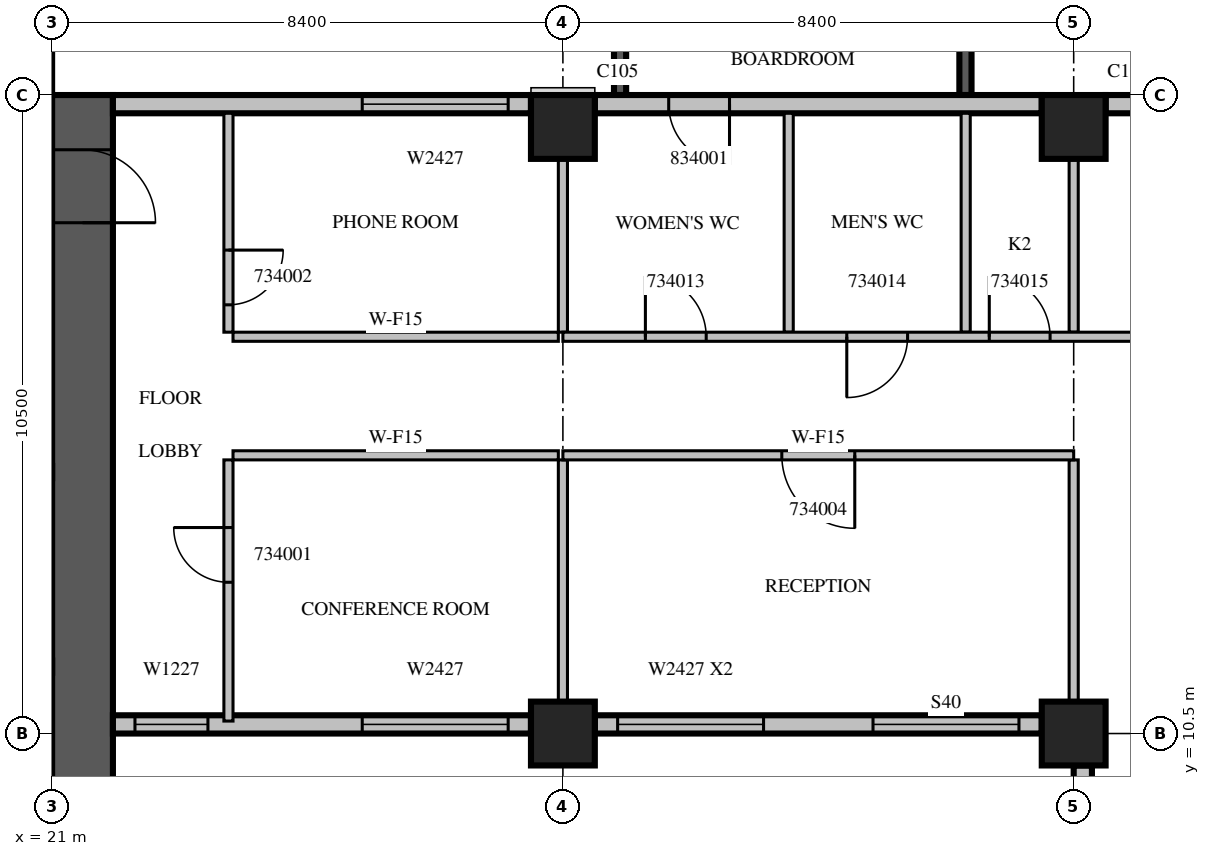
"""IFC4 building model, lengths in metres.
Left out: names, types, materials, properties, quantities, classifications, styles, units other than length and angle.
Written with IfcOpenShell. Run it as: python <this file> out.ifc"""

import sys

from ifc_helpers import new_model, si_unit, direction, frame, frame_2d, origin, origin_2d, place, context, subcontext, project, spatial, rectangle, extrude, source, transform, mapped, element, fill, save


model = new_model("IFC4")
c1 = context("Model", 3, precision=1e-05, world=origin(), true_north=direction((0.0, 1.0)))
c2 = subcontext(c1, "Body", "Model", "MODEL_VIEW")
j1 = project(units=[si_unit("LENGTHUNIT", "METRE"), si_unit("PLANEANGLEUNIT", "RADIAN")], contexts=[c1])
p1 = place(None, origin())
s1 = spatial("IfcSite", under=j1, at=p1, CompositionType="ELEMENT")
p2 = place(p1, origin())
s2 = spatial("IfcBuilding", under=s1, at=p2, CompositionType="ELEMENT")
p3 = place(p2, frame((0.0, 0.0, 153.9)))
s3 = spatial("IfcBuildingStorey", under=s2, at=p3, CompositionType="ELEMENT", Elevation=153.9)
m1 = source(origin(), c2, "Body", "SweptSolid", [
    extrude(rectangle(XDim=1.05, YDim=1.05, at=origin_2d()), origin(), (0.0, 0.0, 1.0), 4.2),
])
for number, where, z_axis, x_axis in (
    (1, (29.4, 10.5, 0.0), (0.0, 0.0, 1.0), (1.0, 0.0, 0.0)),
    (2, (37.8, 10.5, 0.0), (0.0, 0.0, 1.0), (1.0, 0.0, 0.0)),
    (3, (29.4, 20.475, 0.0), (0.0, 0.0, 1.0), (1.0, 0.0, 0.0)),
    (4, (37.8, 20.475, 0.0), (0.0, 0.0, 1.0), (1.0, 0.0, 0.0)),
):
    element("IfcColumn", number, at=place(p3, frame(where, z_axis=z_axis, x_axis=x_axis)), inside=s3, PredefinedType="COLUMN", context=c2, shape_type="MappedRepresentation", body=[
        mapped(m1, transform((0.0, 0.0, 0.0), scale=1.0)),
    ])
m2 = source(origin(), c2, "Body", "SweptSolid", [
    extrude(rectangle(XDim=16.8, YDim=1.0, at=frame_2d((8.4, 0.0))), origin(), (0.0, 0.0, 1.0), 4.2),
])
p4 = place(p3, frame((21.5, 4.2, 0.0), z_axis=(0.0, 0.0, 1.0), x_axis=(0.0, 1.0, 0.0)))
e5 = element("IfcWall", 5, at=p4, inside=s3, PredefinedType="SHEAR", context=c2, shape_type="MappedRepresentation", body=[
    mapped(m2, transform((0.0, 0.0, 0.0), scale=1.0)),
])
m3 = source(origin(), c2, "Body", "SweptSolid", [
    extrude(rectangle(XDim=1.2, YDim=2.1, at=frame_2d((0.6, 1.05))), frame((0.0, 0.51, 0.0), z_axis=(0.0, -1.0, 0.0), x_axis=(1.0, 0.0, 0.0)), (0.0, 0.0, 1.0), 1.02),
])
p5 = place(p4, frame((14.7, 0.0, 0.0)))
e6 = element("IfcOpeningElement", 6, at=p5, cuts=e5, PredefinedType="OPENING", context=c2, shape_type="MappedRepresentation", body=[
    mapped(m3, transform((0.0, 0.0, 0.0), scale=1.0)),
])
m4 = source(origin(), c2, "Body", "SweptSolid", [
    extrude(rectangle(XDim=3.9, YDim=0.2, at=frame_2d((1.95, 0.0))), origin(), (0.0, 0.0, 1.0), 3.8),
])
p6 = place(p3, frame((36.02, 21.0, 0.0), z_axis=(0.0, 0.0, 1.0), x_axis=(0.0, 1.0, 0.0)))
e7 = element("IfcWall", 7, at=p6, inside=s3, PredefinedType="SOLIDWALL", context=c2, shape_type="MappedRepresentation", body=[
    mapped(m4, transform((0.0, 0.0, 0.0), scale=1.0)),
])
m5 = source(origin(), c2, "Body", "SweptSolid", [
    extrude(rectangle(XDim=2.4, YDim=2.7, at=frame_2d((1.2, 1.35))), frame((0.0, 0.11, 0.0), z_axis=(0.0, -1.0, 0.0), x_axis=(1.0, 0.0, 0.0)), (0.0, 0.0, 1.0), 0.22),
])
p7 = place(p6, frame((0.75, 0.0, 0.6)))
e8 = element("IfcOpeningElement", 8, at=p7, cuts=e7, PredefinedType="OPENING", context=c2, shape_type="MappedRepresentation", body=[
    mapped(m5, transform((0.0, 0.0, 0.0), scale=1.0)),
])
p8 = place(p3, frame((30.34, 21.0, 0.0), z_axis=(0.0, 0.0, 1.0), x_axis=(0.0, 1.0, 0.0)))
e9 = element("IfcWall", 9, at=p8, inside=s3, PredefinedType="SOLIDWALL", context=c2, shape_type="MappedRepresentation", body=[
    mapped(m4, transform((0.0, 0.0, 0.0), scale=1.0)),
])
p9 = place(p8, frame((0.75, 0.0, 0.6)))
e10 = element("IfcOpeningElement", 10, at=p9, cuts=e9, PredefinedType="OPENING", context=c2, shape_type="MappedRepresentation", body=[
    mapped(m5, transform((0.0, 0.0, 0.0), scale=1.0)),
])
m6 = source(origin(), c2, "Body", "SweptSolid", [
    extrude(rectangle(XDim=6.875, YDim=0.3, at=frame_2d((3.438, 0.0))), origin(), (0.0, 0.0, 1.0), 3.8),
])
p10 = place(p3, frame((22.0, 10.65, 0.0), z_axis=(0.0, 0.0, 1.0), x_axis=(1.0, 0.0, 0.0)))
e11 = element("IfcWall", 11, at=p10, inside=s3, PredefinedType="STANDARD", context=c2, shape_type="MappedRepresentation", body=[
    mapped(m6, transform((0.0, 0.0, 0.0), scale=1.0)),
])
m7 = source(origin(), c2, "Body", "SweptSolid", [
    extrude(rectangle(XDim=1.2, YDim=2.7, at=frame_2d((0.6, 1.35))), frame((0.0, 0.16, 0.0), z_axis=(0.0, -1.0, 0.0), x_axis=(1.0, 0.0, 0.0)), (0.0, 0.0, 1.0), 0.32),
])
p11 = place(p10, frame((0.362, 0.0, 0.6)))
e12 = element("IfcOpeningElement", 12, at=p11, cuts=e11, PredefinedType="OPENING", context=c2, shape_type="MappedRepresentation", body=[
    mapped(m7, transform((0.0, 0.0, 0.0), scale=1.0)),
])
m8 = source(origin(), c2, "Body", "SweptSolid", [
    extrude(rectangle(XDim=2.4, YDim=2.7, at=frame_2d((1.2, 1.35))), frame((0.0, 0.16, 0.0), z_axis=(0.0, -1.0, 0.0), x_axis=(1.0, 0.0, 0.0)), (0.0, 0.0, 1.0), 0.32),
])
p12 = place(p10, frame((4.1, 0.0, 0.6)))
e13 = element("IfcOpeningElement", 13, at=p12, cuts=e11, PredefinedType="OPENING", context=c2, shape_type="MappedRepresentation", body=[
    mapped(m8, transform((0.0, 0.0, 0.0), scale=1.0)),
])
m9 = source(origin(), c2, "Body", "SweptSolid", [
    extrude(rectangle(XDim=7.35, YDim=0.3, at=frame_2d((3.675, 0.0))), origin(), (0.0, 0.0, 1.0), 3.8),
])
p13 = place(p3, frame((29.925, 10.65, 0.0), z_axis=(0.0, 0.0, 1.0), x_axis=(1.0, 0.0, 0.0)))
e14 = element("IfcWall", 14, at=p13, inside=s3, PredefinedType="STANDARD", context=c2, shape_type="MappedRepresentation", body=[
    mapped(m9, transform((0.0, 0.0, 0.0), scale=1.0)),
])
p14 = place(p13, frame((0.375, 0.0, 0.6)))
e15 = element("IfcOpeningElement", 15, at=p14, cuts=e14, PredefinedType="OPENING", context=c2, shape_type="MappedRepresentation", body=[
    mapped(m8, transform((0.0, 0.0, 0.0), scale=1.0)),
])
p15 = place(p13, frame((4.575, 0.0, 0.6)))
e16 = element("IfcOpeningElement", 16, at=p15, cuts=e14, PredefinedType="OPENING", context=c2, shape_type="MappedRepresentation", body=[
    mapped(m8, transform((0.0, 0.0, 0.0), scale=1.0)),
])
m10 = source(origin(), c2, "Body", "SweptSolid", [
    extrude(rectangle(XDim=8.925, YDim=0.3, at=frame_2d((4.463, 0.0))), origin(), (0.0, 0.0, 1.0), 3.8),
])
p16 = place(p3, frame((37.95, 9.975, 0.0), z_axis=(0.0, 0.0, 1.0), x_axis=(0.0, -1.0, 0.0)))
e17 = element("IfcWall", 17, at=p16, inside=s3, PredefinedType="STANDARD", context=c2, shape_type="MappedRepresentation", body=[
    mapped(m10, transform((0.0, 0.0, 0.0), scale=1.0)),
])
m11 = source(origin(), c2, "Body", "SweptSolid", [
    extrude(rectangle(XDim=1.8, YDim=2.7, at=frame_2d((0.9, 1.35))), frame((0.0, 0.16, 0.0), z_axis=(0.0, -1.0, 0.0), x_axis=(1.0, 0.0, 0.0)), (0.0, 0.0, 1.0), 0.32),
])
p17 = place(p16, frame((1.887, 0.0, 0.6)))
e18 = element("IfcOpeningElement", 18, at=p17, cuts=e17, PredefinedType="OPENING", context=c2, shape_type="MappedRepresentation", body=[
    mapped(m11, transform((0.0, 0.0, 0.0), scale=1.0)),
])
p18 = place(p16, frame((6.15, 0.0, 0.6)))
e19 = element("IfcOpeningElement", 19, at=p18, cuts=e17, PredefinedType="OPENING", context=c2, shape_type="MappedRepresentation", body=[
    mapped(m8, transform((0.0, 0.0, 0.0), scale=1.0)),
])
p19 = place(p3, frame((45.675, 20.85, 0.0), z_axis=(0.0, 0.0, 1.0), x_axis=(-1.0, 0.0, 0.0)))
e20 = element("IfcWall", 20, at=p19, inside=s3, PredefinedType="STANDARD", context=c2, shape_type="MappedRepresentation", body=[
    mapped(m9, transform((0.0, 0.0, 0.0), scale=1.0)),
])
m12 = source(origin(), c2, "Body", "SweptSolid", [
    extrude(rectangle(XDim=1.0, YDim=2.1, at=frame_2d((0.5, 1.05))), frame((0.0, 0.16, 0.0), z_axis=(0.0, -1.0, 0.0), x_axis=(1.0, 0.0, 0.0)), (0.0, 0.0, 1.0), 0.32),
])
p20 = place(p19, frame((1.075, 0.0, 0.0)))
e21 = element("IfcOpeningElement", 21, at=p20, cuts=e20, PredefinedType="OPENING", context=c2, shape_type="MappedRepresentation", body=[
    mapped(m12, transform((0.0, 0.0, 0.0), scale=1.0)),
])
p21 = place(p3, frame((37.275, 20.85, 0.0), z_axis=(0.0, 0.0, 1.0), x_axis=(-1.0, 0.0, 0.0)))
e22 = element("IfcWall", 22, at=p21, inside=s3, PredefinedType="STANDARD", context=c2, shape_type="MappedRepresentation", body=[
    mapped(m9, transform((0.0, 0.0, 0.0), scale=1.0)),
])
p22 = place(p21, frame((5.135, 0.0, 0.0)))
e23 = element("IfcOpeningElement", 23, at=p22, cuts=e22, PredefinedType="OPENING", context=c2, shape_type="MappedRepresentation", body=[
    mapped(m12, transform((0.0, 0.0, 0.0), scale=1.0)),
])
p23 = place(p3, frame((28.875, 20.85, 0.0), z_axis=(0.0, 0.0, 1.0), x_axis=(-1.0, 0.0, 0.0)))
e24 = element("IfcWall", 24, at=p23, inside=s3, PredefinedType="STANDARD", context=c2, shape_type="MappedRepresentation", body=[
    mapped(m6, transform((0.0, 0.0, 0.0), scale=1.0)),
])
p24 = place(p23, frame((0.375, 0.0, 0.6)))
e25 = element("IfcOpeningElement", 25, at=p24, cuts=e24, PredefinedType="OPENING", context=c2, shape_type="MappedRepresentation", body=[
    mapped(m8, transform((0.0, 0.0, 0.0), scale=1.0)),
])
m13 = source(origin(), c2, "Body", "SweptSolid", [
    extrude(rectangle(XDim=4.295, YDim=0.15, at=frame_2d((2.147, 0.0))), origin(), (0.0, 0.0, 1.0), 3.8),
])
p25 = place(p3, frame((23.9, 15.0, 0.0), z_axis=(0.0, 0.0, 1.0), x_axis=(0.0, -1.0, 0.0)))
e26 = element("IfcWall", 26, at=p25, inside=s3, PredefinedType="PARTITIONING", context=c2, shape_type="MappedRepresentation", body=[
    mapped(m13, transform((0.0, 0.0, 0.0), scale=1.0)),
])
m14 = source(origin(), c2, "Body", "SweptSolid", [
    extrude(rectangle(XDim=0.9, YDim=2.1, at=frame_2d((0.45, 1.05))), frame((0.0, 0.085, 0.0), z_axis=(0.0, -1.0, 0.0), x_axis=(1.0, 0.0, 0.0)), (0.0, 0.0, 1.0), 0.17),
])
p26 = place(p25, frame((1.113, 0.0, 0.0)))
e27 = element("IfcOpeningElement", 27, at=p26, cuts=e26, PredefinedType="OPENING", context=c2, shape_type="MappedRepresentation", body=[
    mapped(m14, transform((0.0, 0.0, 0.0), scale=1.0)),
])
m15 = source(origin(), c2, "Body", "SweptSolid", [
    extrude(rectangle(XDim=3.6, YDim=0.15, at=frame_2d((1.8, 0.0))), origin(), (0.0, 0.0, 1.0), 3.8),
])
p27 = place(p3, frame((23.9, 20.7, 0.0), z_axis=(0.0, 0.0, 1.0), x_axis=(0.0, -1.0, 0.0)))
e28 = element("IfcWall", 28, at=p27, inside=s3, PredefinedType="PARTITIONING", context=c2, shape_type="MappedRepresentation", body=[
    mapped(m15, transform((0.0, 0.0, 0.0), scale=1.0)),
])
p28 = place(p27, frame((2.25, 0.0, 0.0)))
e29 = element("IfcOpeningElement", 29, at=p28, cuts=e28, PredefinedType="OPENING", context=c2, shape_type="MappedRepresentation", body=[
    mapped(m14, transform((0.0, 0.0, 0.0), scale=1.0)),
])
m16 = source(origin(), c2, "Body", "SweptSolid", [
    extrude(rectangle(XDim=5.35, YDim=0.15, at=frame_2d((2.675, 0.0))), origin(), (0.0, 0.0, 1.0), 3.8),
])
for number, where, z_axis, x_axis in (
    (30, (29.325, 15.075, 0.0), (0.0, 0.0, 1.0), (-1.0, 0.0, 0.0)),
    (31, (23.975, 17.025, 0.0), (0.0, 0.0, 1.0), (1.0, 0.0, 0.0)),
):
    element("IfcWall", number, at=place(p3, frame(where, z_axis=z_axis, x_axis=x_axis)), inside=s3, PredefinedType="PARTITIONING", context=c2, shape_type="MappedRepresentation", body=[
        mapped(m16, transform((0.0, 0.0, 0.0), scale=1.0)),
    ])
m17 = source(origin(), c2, "Body", "SweptSolid", [
    extrude(rectangle(XDim=3.976, YDim=0.15, at=frame_2d((1.988, 0.0))), origin(), (0.0, 0.0, 1.0), 3.8),
])
p29 = place(p3, frame((29.4, 11.024, 0.0), z_axis=(0.0, 0.0, 1.0), x_axis=(0.0, 1.0, 0.0)))
e32 = element("IfcWall", 32, at=p29, inside=s3, PredefinedType="PARTITIONING", context=c2, shape_type="MappedRepresentation", body=[
    mapped(m17, transform((0.0, 0.0, 0.0), scale=1.0)),
])
m18 = source(origin(), c2, "Body", "SweptSolid", [
    extrude(rectangle(XDim=2.851, YDim=0.15, at=frame_2d((1.425, 0.0))), origin(), (0.0, 0.0, 1.0), 3.8),
])
p30 = place(p3, frame((29.4, 17.1, 0.0), z_axis=(0.0, 0.0, 1.0), x_axis=(0.0, 1.0, 0.0)))
e33 = element("IfcWall", 33, at=p30, inside=s3, PredefinedType="PARTITIONING", context=c2, shape_type="MappedRepresentation", body=[
    mapped(m18, transform((0.0, 0.0, 0.0), scale=1.0)),
])
p31 = place(p3, frame((37.8, 11.024, 0.0), z_axis=(0.0, 0.0, 1.0), x_axis=(0.0, 1.0, 0.0)))
e34 = element("IfcWall", 34, at=p31, inside=s3, PredefinedType="PARTITIONING", context=c2, shape_type="MappedRepresentation", body=[
    mapped(m17, transform((0.0, 0.0, 0.0), scale=1.0)),
])
for number, where, z_axis, x_axis in (
    (35, (33.113, 20.7, 0.0), (0.0, 0.0, 1.0), (0.0, -1.0, 0.0)),
    (36, (36.024, 20.7, 0.0), (0.0, 0.0, 1.0), (0.0, -1.0, 0.0)),
):
    element("IfcWall", number, at=place(p3, frame(where, z_axis=z_axis, x_axis=x_axis)), inside=s3, PredefinedType="PARTITIONING", context=c2, shape_type="MappedRepresentation", body=[
        mapped(m15, transform((0.0, 0.0, 0.0), scale=1.0)),
    ])
p32 = place(p3, frame((37.8, 17.1, 0.0), z_axis=(0.0, 0.0, 1.0), x_axis=(0.0, 1.0, 0.0)))
e37 = element("IfcWall", 37, at=p32, inside=s3, PredefinedType="PARTITIONING", context=c2, shape_type="MappedRepresentation", body=[
    mapped(m18, transform((0.0, 0.0, 0.0), scale=1.0)),
])
m19 = source(origin(), c2, "Body", "SweptSolid", [
    extrude(rectangle(XDim=8.4, YDim=0.15, at=frame_2d((4.2, 0.0))), origin(), (0.0, 0.0, 1.0), 3.8),
])
p33 = place(p3, frame((37.8, 15.075, 0.0), z_axis=(0.0, 0.0, 1.0), x_axis=(-1.0, 0.0, 0.0)))
e38 = element("IfcWall", 38, at=p33, inside=s3, PredefinedType="PARTITIONING", context=c2, shape_type="MappedRepresentation", body=[
    mapped(m19, transform((0.0, 0.0, 0.0), scale=1.0)),
])
m20 = source(origin(), c2, "Body", "SweptSolid", [
    extrude(rectangle(XDim=1.2, YDim=2.1, at=frame_2d((0.6, 1.05))), frame((0.0, 0.085, 0.0), z_axis=(0.0, -1.0, 0.0), x_axis=(1.0, 0.0, 0.0)), (0.0, 0.0, 1.0), 0.17),
])
p34 = place(p33, frame((3.6, 0.0, 0.0)))
e39 = element("IfcOpeningElement", 39, at=p34, cuts=e38, PredefinedType="OPENING", context=c2, shape_type="MappedRepresentation", body=[
    mapped(m20, transform((0.0, 0.0, 0.0), scale=1.0)),
])
m21 = source(origin(), c2, "Body", "SweptSolid", [
    extrude(rectangle(XDim=37.5, YDim=0.15, at=frame_2d((18.75, 0.0))), origin(), (0.0, 0.0, 1.0), 3.8),
])
p35 = place(p3, frame((29.4, 17.025, 0.0), z_axis=(0.0, 0.0, 1.0), x_axis=(1.0, 0.0, 0.0)))
e40 = element("IfcWall", 40, at=p35, inside=s3, PredefinedType="PARTITIONING", context=c2, shape_type="MappedRepresentation", body=[
    mapped(m21, transform((0.0, 0.0, 0.0), scale=1.0)),
])
m22 = source(origin(), c2, "Body", "SweptSolid", [
    extrude(rectangle(XDim=1.0, YDim=2.1, at=frame_2d((0.5, 1.05))), frame((0.0, 0.085, 0.0), z_axis=(0.0, -1.0, 0.0), x_axis=(1.0, 0.0, 0.0)), (0.0, 0.0, 1.0), 0.17),
])
p36 = place(p35, frame((1.357, 0.0, 0.0)))
e41 = element("IfcOpeningElement", 41, at=p36, cuts=e40, PredefinedType="OPENING", context=c2, shape_type="MappedRepresentation", body=[
    mapped(m22, transform((0.0, 0.0, 0.0), scale=1.0)),
])
p37 = place(p35, frame((4.669, 0.0, 0.0)))
e42 = element("IfcOpeningElement", 42, at=p37, cuts=e40, PredefinedType="OPENING", context=c2, shape_type="MappedRepresentation", body=[
    mapped(m22, transform((0.0, 0.0, 0.0), scale=1.0)),
])
p38 = place(p35, frame((7.012, 0.0, 0.0)))
e43 = element("IfcOpeningElement", 43, at=p38, cuts=e40, PredefinedType="OPENING", context=c2, shape_type="MappedRepresentation", body=[
    mapped(m22, transform((0.0, 0.0, 0.0), scale=1.0)),
])
p39 = place(p35, frame((10.05, 0.0, 0.0)))
e44 = element("IfcOpeningElement", 44, at=p39, cuts=e40, PredefinedType="OPENING", context=c2, shape_type="MappedRepresentation", body=[
    mapped(m14, transform((0.0, 0.0, 0.0), scale=1.0)),
])
p40 = place(p35, frame((14.62, 0.0, 0.0)))
e45 = element("IfcOpeningElement", 45, at=p40, cuts=e40, PredefinedType="OPENING", context=c2, shape_type="MappedRepresentation", body=[
    mapped(m22, transform((0.0, 0.0, 0.0), scale=1.0)),
])
p41 = place(p35, frame((19.66, 0.0, 0.0)))
e46 = element("IfcOpeningElement", 46, at=p41, cuts=e40, PredefinedType="OPENING", context=c2, shape_type="MappedRepresentation", body=[
    mapped(m22, transform((0.0, 0.0, 0.0), scale=1.0)),
])
p42 = place(p35, frame((25.804, 0.0, 0.0)))
e47 = element("IfcOpeningElement", 47, at=p42, cuts=e40, PredefinedType="OPENING", context=c2, shape_type="MappedRepresentation", body=[
    mapped(m20, transform((0.0, 0.0, 0.0), scale=1.0)),
])
p43 = place(p35, frame((33.251, 0.0, 0.0)))
e48 = element("IfcOpeningElement", 48, at=p43, cuts=e40, PredefinedType="OPENING", context=c2, shape_type="MappedRepresentation", body=[
    mapped(m20, transform((0.0, 0.0, 0.0), scale=1.0)),
])
m23 = source(origin(), c2, "Body", "SweptSolid", [
    extrude(rectangle(XDim=1.2, YDim=2.7, at=frame_2d((0.6, 1.35))), frame((0.0, 0.03, 0.0), z_axis=(0.0, -1.0, 0.0), x_axis=(1.0, 0.0, 0.0)), (0.0, 0.0, 1.0), 0.06),
])
p44 = place(p11, origin())
e49 = element("IfcWindow", 49, at=p44, inside=s3, PartitioningType="SINGLE_PANEL", PredefinedType="WINDOW", context=c2, shape_type="MappedRepresentation", body=[
    mapped(m23, transform((0.0, 0.0, 0.0), scale=1.0)),
])
fill(e12, e49)
m24 = source(origin(), c2, "Body", "SweptSolid", [
    extrude(rectangle(XDim=2.4, YDim=2.7, at=frame_2d((1.2, 1.35))), frame((0.0, 0.03, 0.0), z_axis=(0.0, -1.0, 0.0), x_axis=(1.0, 0.0, 0.0)), (0.0, 0.0, 1.0), 0.06),
])
p45 = place(p12, origin())
e50 = element("IfcWindow", 50, at=p45, inside=s3, PartitioningType="SINGLE_PANEL", PredefinedType="WINDOW", context=c2, shape_type="MappedRepresentation", body=[
    mapped(m24, transform((0.0, 0.0, 0.0), scale=1.0)),
])
fill(e13, e50)
p46 = place(p14, origin())
e51 = element("IfcWindow", 51, at=p46, inside=s3, PartitioningType="SINGLE_PANEL", PredefinedType="WINDOW", context=c2, shape_type="MappedRepresentation", body=[
    mapped(m24, transform((0.0, 0.0, 0.0), scale=1.0)),
])
fill(e15, e51)
p47 = place(p15, origin())
e52 = element("IfcWindow", 52, at=p47, inside=s3, PartitioningType="SINGLE_PANEL", PredefinedType="WINDOW", context=c2, shape_type="MappedRepresentation", body=[
    mapped(m24, transform((0.0, 0.0, 0.0), scale=1.0)),
])
fill(e16, e52)
p48 = place(p24, origin())
e53 = element("IfcWindow", 53, at=p48, inside=s3, PartitioningType="SINGLE_PANEL", PredefinedType="WINDOW", context=c2, shape_type="MappedRepresentation", body=[
    mapped(m24, transform((0.0, 0.0, 0.0), scale=1.0)),
])
fill(e25, e53)
m25 = source(origin(), c2, "Body", "SweptSolid", [
    extrude(rectangle(XDim=1.2, YDim=2.1, at=frame_2d((0.6, 1.05))), frame((0.0, 0.025, 0.0), z_axis=(0.0, -1.0, 0.0), x_axis=(1.0, 0.0, 0.0)), (0.0, 0.0, 1.0), 0.05),
])
p49 = place(p5, origin())
e54 = element("IfcDoor", 54, at=p49, inside=s3, OperationType="SINGLE_SWING_RIGHT", PredefinedType="DOOR", context=c2, shape_type="MappedRepresentation", body=[
    mapped(m25, transform((0.0, 0.0, 0.0), scale=1.0)),
])
fill(e6, e54)
m26 = source(origin(), c2, "Body", "SweptSolid", [
    extrude(rectangle(XDim=0.9, YDim=2.1, at=frame_2d((0.45, 1.05))), frame((0.0, 0.025, 0.0), z_axis=(0.0, -1.0, 0.0), x_axis=(1.0, 0.0, 0.0)), (0.0, 0.0, 1.0), 0.05),
])
p50 = place(p26, origin())
e55 = element("IfcDoor", 55, at=p50, inside=s3, OperationType="SINGLE_SWING_RIGHT", PredefinedType="DOOR", context=c2, shape_type="MappedRepresentation", body=[
    mapped(m26, transform((0.0, 0.0, 0.0), scale=1.0)),
])
fill(e27, e55)
p51 = place(p28, origin())
e56 = element("IfcDoor", 56, at=p51, inside=s3, OperationType="SINGLE_SWING_LEFT", PredefinedType="DOOR", context=c2, shape_type="MappedRepresentation", body=[
    mapped(m26, transform((0.0, 0.0, 0.0), scale=1.0)),
])
fill(e29, e56)
p52 = place(p34, origin())
e57 = element("IfcDoor", 57, at=p52, inside=s3, OperationType="SINGLE_SWING_LEFT", PredefinedType="DOOR", context=c2, shape_type="MappedRepresentation", body=[
    mapped(m25, transform((0.0, 0.0, 0.0), scale=1.0)),
])
fill(e39, e57)
m27 = source(origin(), c2, "Body", "SweptSolid", [
    extrude(rectangle(XDim=1.0, YDim=2.1, at=frame_2d((0.5, 1.05))), frame((0.0, 0.025, 0.0), z_axis=(0.0, -1.0, 0.0), x_axis=(1.0, 0.0, 0.0)), (0.0, 0.0, 1.0), 0.05),
])
p53 = place(p36, origin())
e58 = element("IfcDoor", 58, at=p53, inside=s3, OperationType="SINGLE_SWING_LEFT", PredefinedType="DOOR", context=c2, shape_type="MappedRepresentation", body=[
    mapped(m27, transform((0.0, 0.0, 0.0), scale=1.0)),
])
fill(e41, e58)
p54 = place(p37, origin())
e59 = element("IfcDoor", 59, at=p54, inside=s3, OperationType="SINGLE_SWING_RIGHT", PredefinedType="DOOR", context=c2, shape_type="MappedRepresentation", body=[
    mapped(m27, transform((0.0, 0.0, 0.0), scale=1.0)),
])
fill(e42, e59)
p55 = place(p38, origin())
e60 = element("IfcDoor", 60, at=p55, inside=s3, OperationType="SINGLE_SWING_LEFT", PredefinedType="DOOR", context=c2, shape_type="MappedRepresentation", body=[
    mapped(m27, transform((0.0, 0.0, 0.0), scale=1.0)),
])
fill(e43, e60)
p56 = place(p22, origin())
e61 = element("IfcDoor", 61, at=p56, inside=s3, OperationType="SINGLE_SWING_LEFT", PredefinedType="DOOR", context=c2, shape_type="MappedRepresentation", body=[
    mapped(m27, transform((0.0, 0.0, 0.0), scale=1.0)),
])
fill(e23, e61)
save(model, sys.argv[1])
